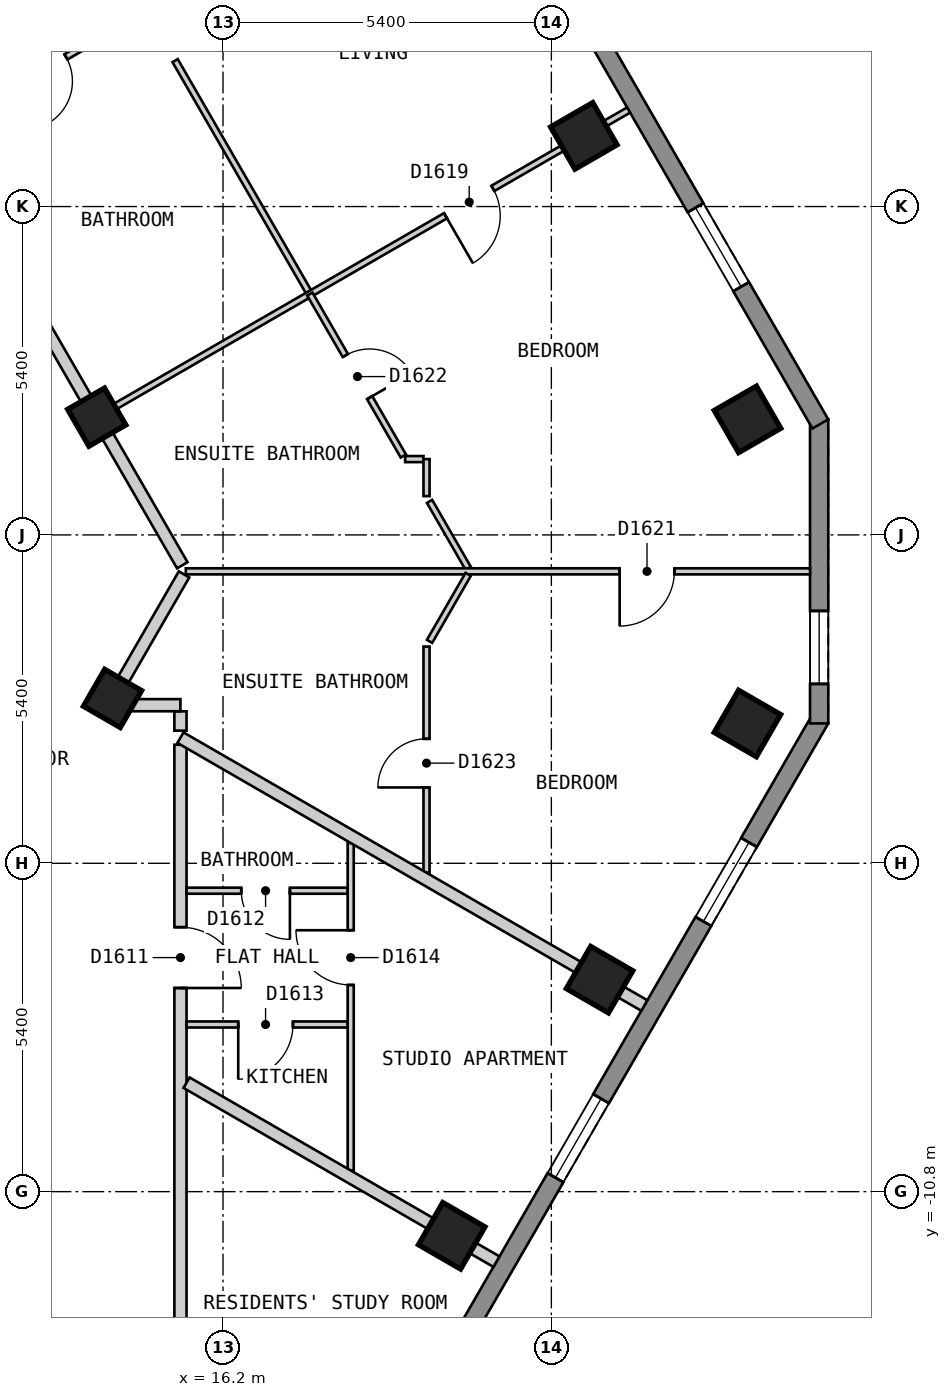
"""IFC4 building model, lengths in metres.
Left out: names, types, materials, properties, quantities, classifications, styles, units other than length and angle.
Written with IfcOpenShell. Run it as: python <this file> out.ifc"""

import sys

from ifc_helpers import new_model, si_unit, direction, frame, frame_2d, origin, origin_2d, place, context, subcontext, project, spatial, polyline, rectangle, outline, extrude, element, fill, save


model = new_model("IFC4")
c1 = context("Model", 3, precision=1e-05, world=origin(), true_north=direction((0.0, 1.0)))
c2 = subcontext(c1, "Body", "Model", "MODEL_VIEW")
j1 = project(units=[si_unit("LENGTHUNIT", "METRE"), si_unit("PLANEANGLEUNIT", "RADIAN")], contexts=[c1])
p1 = place(None, origin())
s1 = spatial("IfcSite", under=j1, at=p1, CompositionType="ELEMENT")
p2 = place(p1, origin())
s2 = spatial("IfcBuilding", under=s1, at=p2, CompositionType="ELEMENT")
p3 = place(p2, frame((0.0, 0.0, 169.2)))
s3 = spatial("IfcBuildingStorey", under=s2, at=p3, CompositionType="ELEMENT", Elevation=169.2)
for number, where, z_axis, x_axis in (
    (1, (19.961, -11.526, 0.0), (0.0, 0.0, 1.0), (0.5, 0.866, 0.0)),
    (2, (22.393, -7.314, 0.0), (0.0, 0.0, 1.0), (0.5, 0.866, 0.0)),
    (3, (24.825, -3.101, 0.0), (0.0, 0.0, 1.0), (0.5, 0.866, 0.0)),
    (4, (24.826, 1.9, 0.0), (0.0, 0.0, 1.0), (-0.5, 0.866, 0.0)),
    (5, (22.134, 6.562, 0.0), (0.0, 0.0, 1.0), (-0.5, 0.866, 0.0)),
):
    element("IfcColumn", number, at=place(p3, frame(where, z_axis=z_axis, x_axis=x_axis)), inside=s3, PredefinedType="COLUMN", context=c2, shape_type="SweptSolid", body=[
        extrude(rectangle(XDim=0.8, YDim=0.8, at=origin_2d()), origin(), (0.0, 0.0, 1.0), 3.0),
    ])
for number, where, z_axis, x_axis in (
    (6, (14.382, -2.689, 0.0), (0.0, 0.0, 1.0), (0.5, 0.866, 0.0)),
    (7, (14.123, 1.937, 0.0), (0.0, 0.0, 1.0), (-0.5, 0.866, 0.0)),
):
    element("IfcColumn", number, at=place(p3, frame(where, z_axis=z_axis, x_axis=x_axis)), inside=s3, PredefinedType="COLUMN", context=c2, shape_type="SweptSolid", body=[
        extrude(rectangle(XDim=0.7, YDim=0.7, at=origin_2d()), origin(), (0.0, 0.0, 1.0), 3.0),
    ])
p4 = place(p3, frame((15.631, -21.025, 0.0), z_axis=(0.0, 0.0, 1.0), x_axis=(0.500018670445, 0.86601462413, 0.0)))
e8 = element("IfcWall", 8, at=p4, inside=s3, PredefinedType="SOLIDWALL", context=c2, shape_type="SweptSolid", body=[
    extrude(outline(polyline([(0.0, -0.15), (20.785, -0.15), (20.705, 0.15), (0.08, 0.15), (0.0, -0.15)])), origin(), (0.0, 0.0, 1.0), 2.7),
])
p5 = place(p4, frame((2.346, 0.0, 0.15)))
e9 = element("IfcOpeningElement", 9, at=p5, cuts=e8, PredefinedType="OPENING", context=c2, shape_type="SweptSolid", body=[
    extrude(rectangle(XDim=1.5, YDim=2.1, at=frame_2d((0.75, 1.05))), frame((0.0, 0.16, 0.0), z_axis=(0.0, -1.0, 0.0), x_axis=(1.0, 0.0, 0.0)), (0.0, 0.0, 1.0), 0.32),
])
p6 = place(p4, frame((7.21, 0.0, 0.15)))
e10 = element("IfcOpeningElement", 10, at=p6, cuts=e8, PredefinedType="OPENING", context=c2, shape_type="SweptSolid", body=[
    extrude(rectangle(XDim=1.5, YDim=2.1, at=frame_2d((0.75, 1.05))), frame((0.0, 0.16, 0.0), z_axis=(0.0, -1.0, 0.0), x_axis=(1.0, 0.0, 0.0)), (0.0, 0.0, 1.0), 0.32),
])
p7 = place(p4, frame((12.073, 0.0, 0.15)))
e11 = element("IfcOpeningElement", 11, at=p7, cuts=e8, PredefinedType="OPENING", context=c2, shape_type="SweptSolid", body=[
    extrude(rectangle(XDim=1.5, YDim=2.1, at=frame_2d((0.75, 1.05))), frame((0.0, 0.16, 0.0), z_axis=(0.0, -1.0, 0.0), x_axis=(1.0, 0.0, 0.0)), (0.0, 0.0, 1.0), 0.32),
])
p8 = place(p4, frame((16.938, 0.0, 0.15)))
e12 = element("IfcOpeningElement", 12, at=p8, cuts=e8, PredefinedType="OPENING", context=c2, shape_type="SweptSolid", body=[
    extrude(rectangle(XDim=1.5, YDim=2.1, at=frame_2d((0.75, 1.05))), frame((0.0, 0.16, 0.0), z_axis=(0.0, -1.0, 0.0), x_axis=(1.0, 0.0, 0.0)), (0.0, 0.0, 1.0), 0.32),
])
p9 = place(p3, frame((26.004, -3.1, 0.0), z_axis=(0.0, 0.0, 1.0), x_axis=(0.0, 1.0, 0.0)))
e13 = element("IfcWall", 13, at=p9, inside=s3, PredefinedType="SOLIDWALL", context=c2, shape_type="SweptSolid", body=[
    extrude(outline(polyline([(0.0, -0.15), (5.0, -0.15), (4.92, 0.15), (0.08, 0.15), (0.0, -0.15)])), origin(), (0.0, 0.0, 1.0), 2.7),
])
p10 = place(p9, frame((0.65, 0.0, 0.15)))
e14 = element("IfcOpeningElement", 14, at=p10, cuts=e13, PredefinedType="OPENING", context=c2, shape_type="SweptSolid", body=[
    extrude(rectangle(XDim=1.2, YDim=2.1, at=frame_2d((0.6, 1.05))), frame((0.0, 0.16, 0.0), z_axis=(0.0, -1.0, 0.0), x_axis=(1.0, 0.0, 0.0)), (0.0, 0.0, 1.0), 0.32),
])
p11 = place(p3, frame((26.024, 1.825, 0.0), z_axis=(0.0, 0.0, 1.0), x_axis=(-0.500010537973, 0.866019319597, 0.0)))
e15 = element("IfcWall", 15, at=p11, inside=s3, PredefinedType="SOLIDWALL", context=c2, shape_type="SweptSolid", body=[
    extrude(outline(polyline([(0.0, -0.15), (22.863, -0.15), (22.783, 0.15), (0.08, 0.15), (0.0, -0.15)])), origin(), (0.0, 0.0, 1.0), 2.7),
])
p12 = place(p11, frame((2.606, 0.0, 0.15)))
e16 = element("IfcOpeningElement", 16, at=p12, cuts=e15, PredefinedType="OPENING", context=c2, shape_type="SweptSolid", body=[
    extrude(rectangle(XDim=1.5, YDim=2.1, at=frame_2d((0.75, 1.05))), frame((0.0, 0.16, 0.0), z_axis=(0.0, -1.0, 0.0), x_axis=(1.0, 0.0, 0.0)), (0.0, 0.0, 1.0), 0.32),
])
p13 = place(p11, frame((7.99, 0.0, 0.15)))
e17 = element("IfcOpeningElement", 17, at=p13, cuts=e15, PredefinedType="OPENING", context=c2, shape_type="SweptSolid", body=[
    extrude(rectangle(XDim=1.5, YDim=2.1, at=frame_2d((0.75, 1.05))), frame((0.0, 0.16, 0.0), z_axis=(0.0, -1.0, 0.0), x_axis=(1.0, 0.0, 0.0)), (0.0, 0.0, 1.0), 0.32),
])
p14 = place(p11, frame((13.373, 0.0, 0.15)))
e18 = element("IfcOpeningElement", 18, at=p14, cuts=e15, PredefinedType="OPENING", context=c2, shape_type="SweptSolid", body=[
    extrude(rectangle(XDim=1.5, YDim=2.1, at=frame_2d((0.75, 1.05))), frame((0.0, 0.16, 0.0), z_axis=(0.0, -1.0, 0.0), x_axis=(1.0, 0.0, 0.0)), (0.0, 0.0, 1.0), 0.32),
])
p15 = place(p11, frame((18.758, 0.0, 0.15)))
e19 = element("IfcOpeningElement", 19, at=p15, cuts=e15, PredefinedType="OPENING", context=c2, shape_type="SweptSolid", body=[
    extrude(rectangle(XDim=1.5, YDim=2.1, at=frame_2d((0.75, 1.05))), frame((0.0, 0.16, 0.0), z_axis=(0.0, -1.0, 0.0), x_axis=(1.0, 0.0, 0.0)), (0.0, 0.0, 1.0), 0.32),
])
p16 = place(p3, frame((10.739, 7.8, 0.0), z_axis=(0.0, 0.0, 1.0), x_axis=(0.499964311759, -0.86604600742, 0.0)))
e20 = element("IfcWall", 20, at=p16, inside=s3, PredefinedType="PARTITIONING", context=c2, shape_type="SweptSolid", body=[
    extrude(rectangle(XDim=9.583, YDim=0.2, at=frame_2d((4.792, 0.0))), origin(), (0.0, 0.0, 1.0), 2.7),
])
p17 = place(p3, frame((15.5, -2.901, 0.0), z_axis=(0.0, 0.0, 1.0), x_axis=(0.0, -1.0, 0.0)))
e21 = element("IfcWall", 21, at=p17, inside=s3, PredefinedType="PARTITIONING", context=c2, shape_type="SweptSolid", body=[
    extrude(rectangle(XDim=0.318, YDim=0.2, at=frame_2d((0.159, 0.0))), origin(), (0.0, 0.0, 1.0), 2.7),
])
p18 = place(p3, frame((14.433, -2.8, 0.0), z_axis=(0.0, 0.0, 1.0), x_axis=(1.0, 0.0, 0.0)))
e22 = element("IfcWall", 22, at=p18, inside=s3, PredefinedType="PARTITIONING", context=c2, shape_type="SweptSolid", body=[
    extrude(rectangle(XDim=1.066, YDim=0.2, at=frame_2d((0.533, 0.0))), origin(), (0.0, 0.0, 1.0), 2.7),
])
p19 = place(p3, frame((14.318, -2.8, 0.0), z_axis=(0.0, 0.0, 1.0), x_axis=(0.49970259524, 0.866197042428, 0.0)))
e23 = element("IfcWall", 23, at=p19, inside=s3, PredefinedType="PARTITIONING", context=c2, shape_type="SweptSolid", body=[
    extrude(rectangle(XDim=2.483, YDim=0.2, at=frame_2d((1.242, 0.0))), origin(), (0.0, 0.0, 1.0), 2.7),
])
p20 = place(p3, frame((15.5, -18.799, 0.0), z_axis=(0.0, 0.0, 1.0), x_axis=(0.0, 1.0, 0.0)))
e24 = element("IfcWall", 24, at=p20, inside=s3, PredefinedType="PARTITIONING", context=c2, shape_type="SweptSolid", body=[
    extrude(rectangle(XDim=15.349, YDim=0.2, at=frame_2d((7.675, 0.0))), origin(), (0.0, 0.0, 1.0), 2.7),
])
p21 = place(p20, frame((4.477, 0.0, 0.0)))
e25 = element("IfcOpeningElement", 25, at=p21, cuts=e24, PredefinedType="OPENING", context=c2, shape_type="SweptSolid", body=[
    extrude(rectangle(XDim=0.8, YDim=2.1, at=frame_2d((0.4, 1.05))), frame((0.0, 0.11, 0.0), z_axis=(0.0, -1.0, 0.0), x_axis=(1.0, 0.0, 0.0)), (0.0, 0.0, 1.0), 0.22),
])
p22 = place(p20, frame((11.348, 0.0, 0.0)))
e26 = element("IfcOpeningElement", 26, at=p22, cuts=e24, PredefinedType="OPENING", context=c2, shape_type="SweptSolid", body=[
    extrude(rectangle(XDim=1.0, YDim=2.1, at=frame_2d((0.5, 1.05))), frame((0.0, 0.11, 0.0), z_axis=(0.0, -1.0, 0.0), x_axis=(1.0, 0.0, 0.0)), (0.0, 0.0, 1.0), 0.22),
])
p23 = place(p3, frame((15.412, 7.8, 0.0), z_axis=(0.0, 0.0, 1.0), x_axis=(0.499882970317, -0.866092960361, 0.0)))
e27 = element("IfcWall", 27, at=p23, inside=s3, PredefinedType="PARTITIONING", context=c2, shape_type="SweptSolid", body=[
    extrude(rectangle(XDim=4.433, YDim=0.1, at=frame_2d((2.216, 0.0))), origin(), (0.0, 0.0, 1.0), 2.7),
])
p24 = place(p3, frame((19.597, 0.551, 0.0), z_axis=(0.0, 0.0, 1.0), x_axis=(0.499922110319, -0.866070368743, 0.0)))
e28 = element("IfcWall", 28, at=p24, inside=s3, PredefinedType="PARTITIONING", context=c2, shape_type="SweptSolid", body=[
    extrude(rectangle(XDim=1.27, YDim=0.1, at=frame_2d((0.635, 0.0))), origin(), (0.0, 0.0, 1.0), 2.7),
])
p25 = place(p3, frame((15.6, -5.851, 0.0), z_axis=(0.0, 0.0, 1.0), x_axis=(1.0, 0.0, 0.0)))
e29 = element("IfcWall", 29, at=p25, inside=s3, PredefinedType="PARTITIONING", context=c2, shape_type="SweptSolid", body=[
    extrude(rectangle(XDim=2.65, YDim=0.1, at=frame_2d((1.325, 0.0))), origin(), (0.0, 0.0, 1.0), 2.7),
])
p26 = place(p25, frame((0.9, 0.0, 0.0)))
e30 = element("IfcOpeningElement", 30, at=p26, cuts=e29, PredefinedType="OPENING", context=c2, shape_type="SweptSolid", body=[
    extrude(rectangle(XDim=0.8, YDim=2.1, at=frame_2d((0.4, 1.05))), frame((0.0, 0.06, 0.0), z_axis=(0.0, -1.0, 0.0), x_axis=(1.0, 0.0, 0.0)), (0.0, 0.0, 1.0), 0.12),
])
p27 = place(p3, frame((15.588, -0.599, 0.0), z_axis=(0.0, 0.0, 1.0), x_axis=(1.0, 0.0, 0.0)))
e31 = element("IfcWall", 31, at=p27, inside=s3, PredefinedType="PARTITIONING", context=c2, shape_type="SweptSolid", body=[
    extrude(rectangle(XDim=10.266, YDim=0.1, at=frame_2d((5.133, 0.0))), origin(), (0.0, 0.0, 1.0), 2.7),
])
p28 = place(p27, frame((7.135, 0.0, 0.0)))
e32 = element("IfcOpeningElement", 32, at=p28, cuts=e31, PredefinedType="OPENING", context=c2, shape_type="SweptSolid", body=[
    extrude(rectangle(XDim=0.9, YDim=2.1, at=frame_2d((0.45, 1.05))), frame((0.0, 0.06, 0.0), z_axis=(0.0, -1.0, 0.0), x_axis=(1.0, 0.0, 0.0)), (0.0, 0.0, 1.0), 0.12),
])
p29 = place(p3, frame((15.6, -8.051, 0.0), z_axis=(0.0, 0.0, 1.0), x_axis=(1.0, 0.0, 0.0)))
e33 = element("IfcWall", 33, at=p29, inside=s3, PredefinedType="PARTITIONING", context=c2, shape_type="SweptSolid", body=[
    extrude(rectangle(XDim=2.65, YDim=0.1, at=frame_2d((1.325, 0.0))), origin(), (0.0, 0.0, 1.0), 2.7),
])
p30 = place(p29, frame((0.85, 0.0, 0.0)))
e34 = element("IfcOpeningElement", 34, at=p30, cuts=e33, PredefinedType="OPENING", context=c2, shape_type="SweptSolid", body=[
    extrude(rectangle(XDim=0.9, YDim=2.1, at=frame_2d((0.45, 1.05))), frame((0.0, 0.06, 0.0), z_axis=(0.0, -1.0, 0.0), x_axis=(1.0, 0.0, 0.0)), (0.0, 0.0, 1.0), 0.12),
])
p31 = place(p3, frame((19.195, 1.247, 0.0), z_axis=(0.0, 0.0, 1.0), x_axis=(1.0, 0.0, 0.0)))
e35 = element("IfcWall", 35, at=p31, inside=s3, PredefinedType="PARTITIONING", context=c2, shape_type="SweptSolid", body=[
    extrude(rectangle(XDim=0.302, YDim=0.1, at=frame_2d((0.151, 0.0))), origin(), (0.0, 0.0, 1.0), 2.7),
])
p32 = place(p3, frame((19.597, -1.75, 0.0), z_axis=(0.0, 0.0, 1.0), x_axis=(0.499589422776, 0.866262320923, 0.0)))
e36 = element("IfcWall", 36, at=p32, inside=s3, PredefinedType="PARTITIONING", context=c2, shape_type="SweptSolid", body=[
    extrude(rectangle(XDim=1.271, YDim=0.1, at=frame_2d((0.635, 0.0))), origin(), (0.0, 0.0, 1.0), 2.7),
])
p33 = place(p3, frame((18.3, -10.452, 0.0), z_axis=(0.0, 0.0, 1.0), x_axis=(0.0, 1.0, 0.0)))
e37 = element("IfcWall", 37, at=p33, inside=s3, PredefinedType="PARTITIONING", context=c2, shape_type="SweptSolid", body=[
    extrude(rectangle(XDim=5.386, YDim=0.1, at=frame_2d((2.693, 0.0))), origin(), (0.0, 0.0, 1.0), 2.7),
])
p34 = place(p33, frame((3.051, 0.0, 0.0)))
e38 = element("IfcOpeningElement", 38, at=p34, cuts=e37, PredefinedType="OPENING", context=c2, shape_type="SweptSolid", body=[
    extrude(rectangle(XDim=0.9, YDim=2.1, at=frame_2d((0.45, 1.05))), frame((0.0, 0.06, 0.0), z_axis=(0.0, -1.0, 0.0), x_axis=(1.0, 0.0, 0.0)), (0.0, 0.0, 1.0), 0.12),
])
p35 = place(p3, frame((19.547, -5.555, 0.0), z_axis=(0.0, 0.0, 1.0), x_axis=(0.0, 1.0, 0.0)))
e39 = element("IfcWall", 39, at=p35, inside=s3, PredefinedType="PARTITIONING", context=c2, shape_type="SweptSolid", body=[
    extrude(rectangle(XDim=3.719, YDim=0.1, at=frame_2d((1.859, 0.0))), origin(), (0.0, 0.0, 1.0), 2.7),
])
p36 = place(p35, frame((1.402, 0.0, 0.0)))
e40 = element("IfcOpeningElement", 40, at=p36, cuts=e39, PredefinedType="OPENING", context=c2, shape_type="SweptSolid", body=[
    extrude(rectangle(XDim=0.8, YDim=2.1, at=frame_2d((0.4, 1.05))), frame((0.0, 0.06, 0.0), z_axis=(0.0, -1.0, 0.0), x_axis=(1.0, 0.0, 0.0)), (0.0, 0.0, 1.0), 0.12),
])
p37 = place(p3, frame((19.547, 0.638, 0.0), z_axis=(0.0, 0.0, 1.0), x_axis=(0.0, 1.0, 0.0)))
e41 = element("IfcWall", 41, at=p37, inside=s3, PredefinedType="PARTITIONING", context=c2, shape_type="SweptSolid", body=[
    extrude(rectangle(XDim=0.609, YDim=0.1, at=frame_2d((0.305, 0.0))), origin(), (0.0, 0.0, 1.0), 2.7),
])
p38 = place(p3, frame((14.21, 1.987, 0.0), z_axis=(0.0, 0.0, 1.0), x_axis=(0.866022959057, 0.500004234368, 0.0)))
e42 = element("IfcWall", 42, at=p38, inside=s3, PredefinedType="PARTITIONING", context=c2, shape_type="SweptSolid", body=[
    extrude(rectangle(XDim=10.0, YDim=0.1, at=frame_2d((5.0, 0.0))), origin(), (0.0, 0.0, 1.0), 2.7),
])
p39 = place(p38, frame((6.523, 0.0, 0.0)))
e43 = element("IfcOpeningElement", 43, at=p39, cuts=e42, PredefinedType="OPENING", context=c2, shape_type="SweptSolid", body=[
    extrude(rectangle(XDim=0.9, YDim=2.1, at=frame_2d((0.45, 1.05))), frame((0.0, 0.06, 0.0), z_axis=(0.0, -1.0, 0.0), x_axis=(1.0, 0.0, 0.0)), (0.0, 0.0, 1.0), 0.12),
])
p40 = place(p3, frame((11.518, 6.65, 0.0), z_axis=(0.0, 0.0, 1.0), x_axis=(0.865949381454, 0.500131651427, 0.0)))
e44 = element("IfcWall", 44, at=p40, inside=s3, PredefinedType="PARTITIONING", context=c2, shape_type="SweptSolid", body=[
    extrude(rectangle(XDim=4.097, YDim=0.1, at=frame_2d((2.049, 0.0))), origin(), (0.0, 0.0, 1.0), 2.7),
])
p41 = place(p40, frame((1.623, 0.0, 0.0)))
e45 = element("IfcOpeningElement", 45, at=p41, cuts=e44, PredefinedType="OPENING", context=c2, shape_type="SweptSolid", body=[
    extrude(rectangle(XDim=0.8, YDim=2.1, at=frame_2d((0.4, 1.05))), frame((0.0, 0.06, 0.0), z_axis=(0.0, -1.0, 0.0), x_axis=(1.0, 0.0, 0.0)), (0.0, 0.0, 1.0), 0.12),
])
p42 = place(p3, frame((15.6, -9.008, 0.0), z_axis=(0.0, 0.0, 1.0), x_axis=(0.866013576751, -0.500020484464, 0.0)))
e46 = element("IfcWall", 46, at=p42, inside=s3, PredefinedType="PARTITIONING", context=c2, shape_type="SweptSolid", body=[
    extrude(rectangle(XDim=5.885, YDim=0.2, at=frame_2d((2.943, 0.0))), origin(), (0.0, 0.0, 1.0), 2.7),
])
p43 = place(p3, frame((15.5, -3.334, 0.0), z_axis=(0.0, 0.0, 1.0), x_axis=(0.866001896501, -0.5000407136, 0.0)))
e47 = element("IfcWall", 47, at=p43, inside=s3, PredefinedType="PARTITIONING", context=c2, shape_type="SweptSolid", body=[
    extrude(rectangle(XDim=8.809, YDim=0.2, at=frame_2d((4.405, 0.0))), origin(), (0.0, 0.0, 1.0), 2.7),
])
p44 = place(p3, frame((17.628, 3.961, 0.0), z_axis=(0.0, 0.0, 1.0), x_axis=(0.50003162148, -0.866007146345, 0.0)))
e48 = element("IfcWall", 48, at=p44, inside=s3, PredefinedType="PARTITIONING", context=c2, shape_type="SweptSolid", body=[
    extrude(rectangle(XDim=3.076, YDim=0.1, at=frame_2d((1.538, 0.0))), origin(), (0.0, 0.0, 1.0), 2.7),
])
p45 = place(p44, frame((1.167, 0.0, 0.0)))
e49 = element("IfcOpeningElement", 49, at=p45, cuts=e48, PredefinedType="OPENING", context=c2, shape_type="SweptSolid", body=[
    extrude(rectangle(XDim=0.8, YDim=2.1, at=frame_2d((0.4, 1.05))), frame((0.0, 0.06, 0.0), z_axis=(0.0, -1.0, 0.0), x_axis=(1.0, 0.0, 0.0)), (0.0, 0.0, 1.0), 0.12),
])
p46 = place(p7, origin())
e50 = element("IfcWindow", 50, at=p46, inside=s3, PartitioningType="SINGLE_PANEL", PredefinedType="WINDOW", context=c2, shape_type="SweptSolid", body=[
    extrude(rectangle(XDim=1.5, YDim=2.1, at=frame_2d((0.75, 1.05))), frame((0.0, 0.03, 0.0), z_axis=(0.0, -1.0, 0.0), x_axis=(1.0, 0.0, 0.0)), (0.0, 0.0, 1.0), 0.06),
])
fill(e11, e50)
p47 = place(p8, origin())
e51 = element("IfcWindow", 51, at=p47, inside=s3, PartitioningType="SINGLE_PANEL", PredefinedType="WINDOW", context=c2, shape_type="SweptSolid", body=[
    extrude(rectangle(XDim=1.5, YDim=2.1, at=frame_2d((0.75, 1.05))), frame((0.0, 0.03, 0.0), z_axis=(0.0, -1.0, 0.0), x_axis=(1.0, 0.0, 0.0)), (0.0, 0.0, 1.0), 0.06),
])
fill(e12, e51)
p48 = place(p10, origin())
e52 = element("IfcWindow", 52, at=p48, inside=s3, PartitioningType="SINGLE_PANEL", PredefinedType="WINDOW", context=c2, shape_type="SweptSolid", body=[
    extrude(rectangle(XDim=1.2, YDim=2.1, at=frame_2d((0.6, 1.05))), frame((0.0, 0.03, 0.0), z_axis=(0.0, -1.0, 0.0), x_axis=(1.0, 0.0, 0.0)), (0.0, 0.0, 1.0), 0.06),
])
fill(e14, e52)
p49 = place(p12, origin())
e53 = element("IfcWindow", 53, at=p49, inside=s3, PartitioningType="SINGLE_PANEL", PredefinedType="WINDOW", context=c2, shape_type="SweptSolid", body=[
    extrude(rectangle(XDim=1.5, YDim=2.1, at=frame_2d((0.75, 1.05))), frame((0.0, 0.03, 0.0), z_axis=(0.0, -1.0, 0.0), x_axis=(1.0, 0.0, 0.0)), (0.0, 0.0, 1.0), 0.06),
])
fill(e16, e53)
p50 = place(p22, origin())
e54 = element("IfcDoor", 54, at=p50, inside=s3, OperationType="SINGLE_SWING_LEFT", PredefinedType="DOOR", context=c2, shape_type="SweptSolid", body=[
    extrude(rectangle(XDim=1.0, YDim=2.1, at=frame_2d((0.5, 1.05))), frame((0.0, 0.025, 0.0), z_axis=(0.0, -1.0, 0.0), x_axis=(1.0, 0.0, 0.0)), (0.0, 0.0, 1.0), 0.05),
])
fill(e26, e54)
p51 = place(p26, origin())
e55 = element("IfcDoor", 55, at=p51, inside=s3, OperationType="SINGLE_SWING_RIGHT", PredefinedType="DOOR", context=c2, shape_type="SweptSolid", body=[
    extrude(rectangle(XDim=0.8, YDim=2.1, at=frame_2d((0.4, 1.05))), frame((0.0, 0.025, 0.0), z_axis=(0.0, -1.0, 0.0), x_axis=(1.0, 0.0, 0.0)), (0.0, 0.0, 1.0), 0.05),
])
fill(e30, e55)
p52 = place(p30, origin())
e56 = element("IfcDoor", 56, at=p52, inside=s3, OperationType="SINGLE_SWING_LEFT", PredefinedType="DOOR", context=c2, shape_type="SweptSolid", body=[
    extrude(rectangle(XDim=0.9, YDim=2.1, at=frame_2d((0.45, 1.05))), frame((0.0, 0.025, 0.0), z_axis=(0.0, -1.0, 0.0), x_axis=(1.0, 0.0, 0.0)), (0.0, 0.0, 1.0), 0.05),
])
fill(e34, e56)
p53 = place(p34, origin())
e57 = element("IfcDoor", 57, at=p53, inside=s3, OperationType="SINGLE_SWING_RIGHT", PredefinedType="DOOR", context=c2, shape_type="SweptSolid", body=[
    extrude(rectangle(XDim=0.9, YDim=2.1, at=frame_2d((0.45, 1.05))), frame((0.0, 0.025, 0.0), z_axis=(0.0, -1.0, 0.0), x_axis=(1.0, 0.0, 0.0)), (0.0, 0.0, 1.0), 0.05),
])
fill(e38, e57)
p54 = place(p41, origin())
e58 = element("IfcDoor", 58, at=p54, inside=s3, OperationType="SINGLE_SWING_LEFT", PredefinedType="DOOR", context=c2, shape_type="SweptSolid", body=[
    extrude(rectangle(XDim=0.8, YDim=2.1, at=frame_2d((0.4, 1.05))), frame((0.0, 0.025, 0.0), z_axis=(0.0, -1.0, 0.0), x_axis=(1.0, 0.0, 0.0)), (0.0, 0.0, 1.0), 0.05),
])
fill(e45, e58)
p55 = place(p39, origin())
e59 = element("IfcDoor", 59, at=p55, inside=s3, OperationType="SINGLE_SWING_LEFT", PredefinedType="DOOR", context=c2, shape_type="SweptSolid", body=[
    extrude(rectangle(XDim=0.9, YDim=2.1, at=frame_2d((0.45, 1.05))), frame((0.0, 0.025, 0.0), z_axis=(0.0, -1.0, 0.0), x_axis=(1.0, 0.0, 0.0)), (0.0, 0.0, 1.0), 0.05),
])
fill(e43, e59)
p56 = place(p28, origin())
e60 = element("IfcDoor", 60, at=p56, inside=s3, OperationType="SINGLE_SWING_LEFT", PredefinedType="DOOR", context=c2, shape_type="SweptSolid", body=[
    extrude(rectangle(XDim=0.9, YDim=2.1, at=frame_2d((0.45, 1.05))), frame((0.0, 0.025, 0.0), z_axis=(0.0, -1.0, 0.0), x_axis=(1.0, 0.0, 0.0)), (0.0, 0.0, 1.0), 0.05),
])
fill(e32, e60)
p57 = place(p45, origin())
e61 = element("IfcDoor", 61, at=p57, inside=s3, OperationType="SINGLE_SWING_RIGHT", PredefinedType="DOOR", context=c2, shape_type="SweptSolid", body=[
    extrude(rectangle(XDim=0.8, YDim=2.1, at=frame_2d((0.4, 1.05))), frame((0.0, 0.025, 0.0), z_axis=(0.0, -1.0, 0.0), x_axis=(1.0, 0.0, 0.0)), (0.0, 0.0, 1.0), 0.05),
])
fill(e49, e61)
p58 = place(p36, origin())
e62 = element("IfcDoor", 62, at=p58, inside=s3, OperationType="SINGLE_SWING_LEFT", PredefinedType="DOOR", context=c2, shape_type="SweptSolid", body=[
    extrude(rectangle(XDim=0.8, YDim=2.1, at=frame_2d((0.4, 1.05))), frame((0.0, 0.025, 0.0), z_axis=(0.0, -1.0, 0.0), x_axis=(1.0, 0.0, 0.0)), (0.0, 0.0, 1.0), 0.05),
])
fill(e40, e62)
save(model, sys.argv[1])
